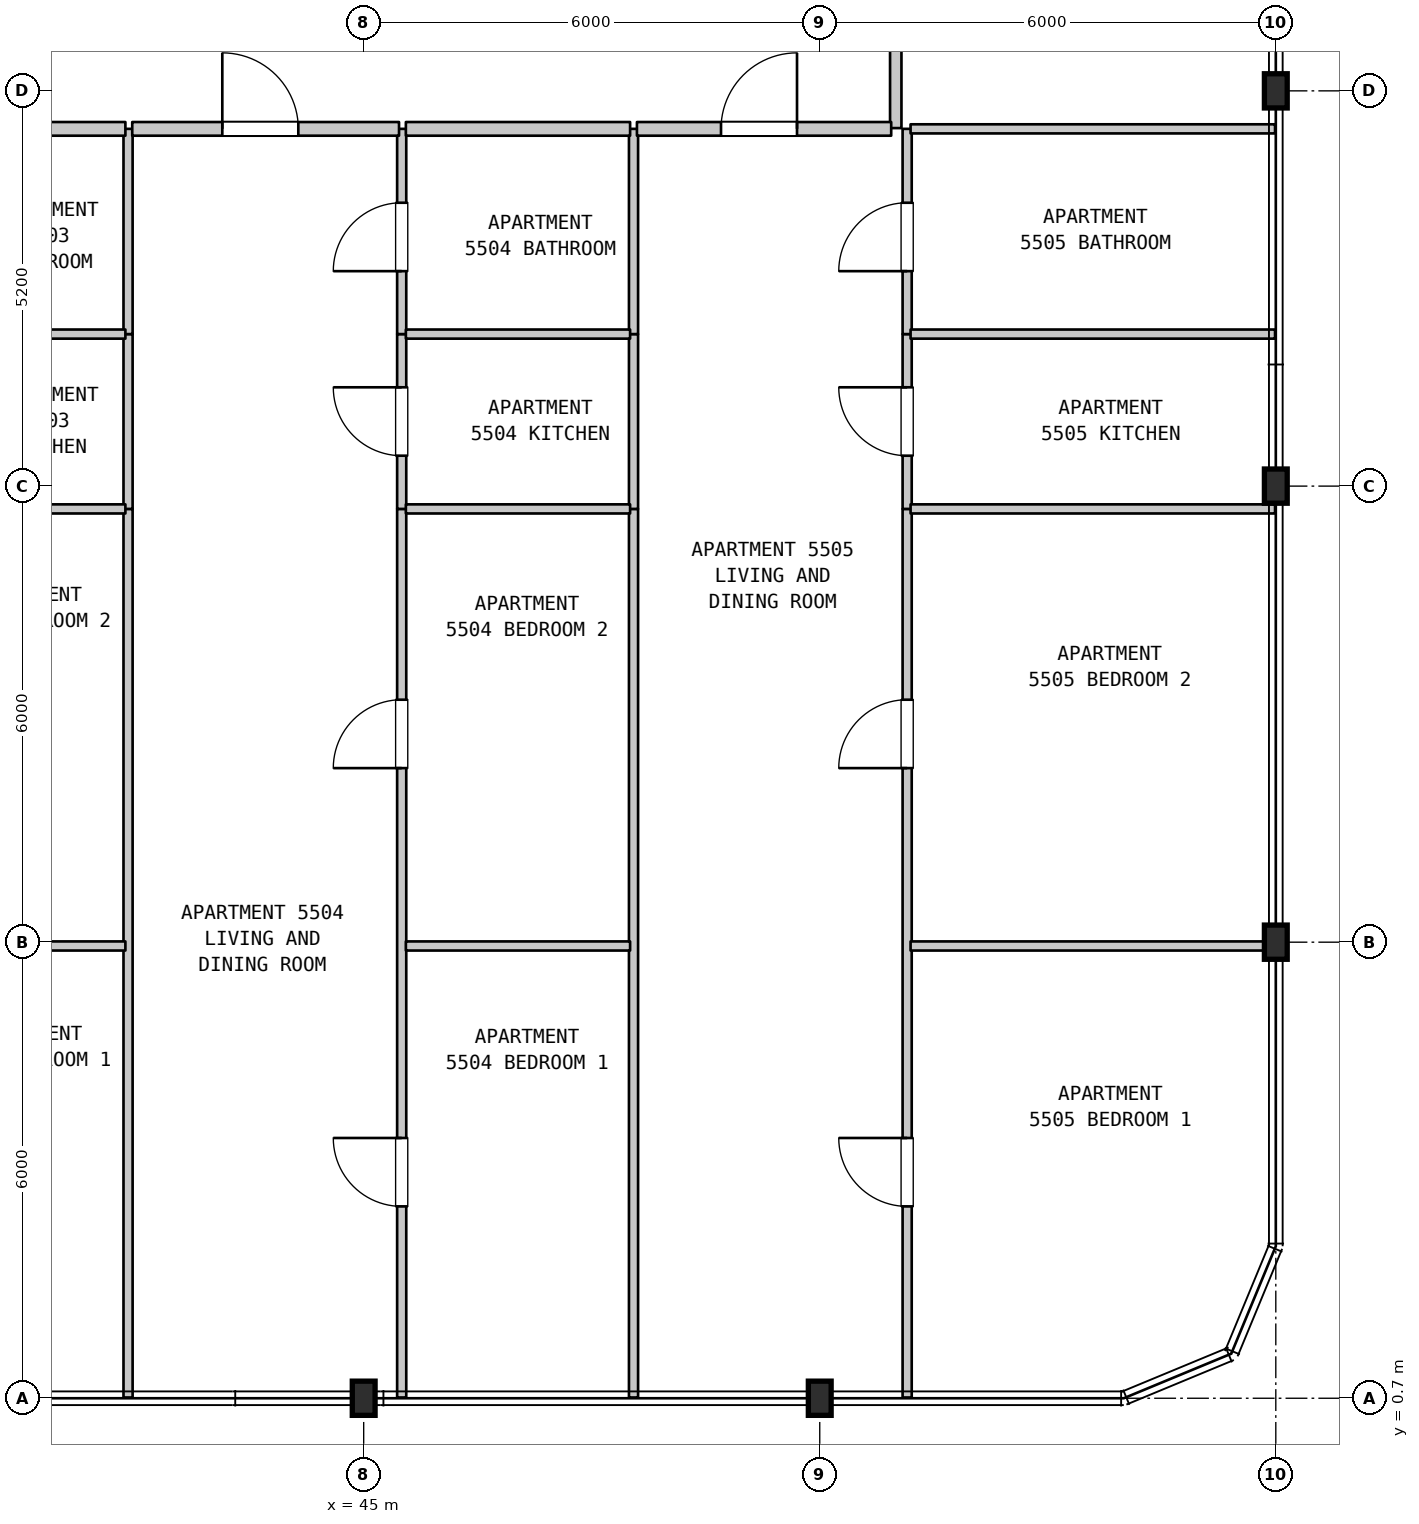
"""IFC4 building model, lengths in metres.
Left out: names, types, materials, properties, quantities, classifications, styles, units other than length and angle.
Written with IfcOpenShell. Run it as: python <this file> out.ifc"""

import sys

from ifc_helpers import new_model, si_unit, direction, frame, frame_2d, origin, origin_2d, place, context, subcontext, project, spatial, rectangle, i_section, extrude, element, fill, save


model = new_model("IFC4")
c1 = context("Model", 3, precision=1e-05, world=origin(), true_north=direction((0.0, 1.0)))
c2 = subcontext(c1, "Body", "Model", "MODEL_VIEW")
j1 = project(units=[si_unit("LENGTHUNIT", "METRE"), si_unit("PLANEANGLEUNIT", "RADIAN")], contexts=[c1])
p1 = place(None, origin())
s1 = spatial("IfcSite", under=j1, at=p1, CompositionType="ELEMENT")
p2 = place(p1, origin())
s2 = spatial("IfcBuilding", under=s1, at=p2, CompositionType="ELEMENT")
p3 = place(p2, frame((0.0, 0.0, 222.8)))
s3 = spatial("IfcBuildingStorey", under=s2, at=p3, CompositionType="ELEMENT", Elevation=222.8)
for number, where, z_axis, x_axis in (
    (1, (45.0, 0.7, 0.0), (0.0, 0.0, 1.0), (1.0, 0.0, 0.0)),
    (2, (51.0, 0.7, 0.0), (0.0, 0.0, 1.0), (1.0, 0.0, 0.0)),
    (3, (57.0, 6.7, 0.0), (0.0, 0.0, 1.0), (1.0, 0.0, 0.0)),
    (4, (57.0, 12.7, 0.0), (0.0, 0.0, 1.0), (1.0, 0.0, 0.0)),
    (5, (57.0, 17.9, 0.0), (0.0, 0.0, 1.0), (1.0, 0.0, 0.0)),
):
    element("IfcColumn", number, at=place(p3, frame(where, z_axis=z_axis, x_axis=x_axis)), inside=s3, PredefinedType="COLUMN", context=c2, shape_type="SweptSolid", body=[
        extrude(i_section(OverallWidth=0.3, OverallDepth=0.45, WebThickness=0.014, FlangeThickness=0.026, FilletRadius=0.027, at=origin_2d()), origin(), (0.0, 0.0, 1.0), 3.7),
    ])
p4 = place(p3, frame((41.9, 0.71, 0.0), z_axis=(0.0, 0.0, 1.0), x_axis=(0.0, 1.0, 0.0)))
e6 = element("IfcWall", 6, at=p4, inside=s3, PredefinedType="PARTITIONING", context=c2, shape_type="SweptSolid", body=[
    extrude(rectangle(XDim=11.69, YDim=0.12, at=frame_2d((5.845, 0.0))), origin(), (0.0, 0.0, 1.0), 3.39),
])
p5 = place(p3, frame((41.9, 12.4, 0.0), z_axis=(0.0, 0.0, 1.0), x_axis=(0.0, 1.0, 0.0)))
e7 = element("IfcWall", 7, at=p5, inside=s3, PredefinedType="PARTITIONING", context=c2, shape_type="SweptSolid", body=[
    extrude(rectangle(XDim=2.3, YDim=0.12, at=frame_2d((1.15, 0.0))), origin(), (0.0, 0.0, 1.0), 3.39),
])
p6 = place(p3, frame((41.9, 14.7, 0.0), z_axis=(0.0, 0.0, 1.0), x_axis=(0.0, 1.0, 0.0)))
e8 = element("IfcWall", 8, at=p6, inside=s3, PredefinedType="PARTITIONING", context=c2, shape_type="SweptSolid", body=[
    extrude(rectangle(XDim=2.7, YDim=0.12, at=frame_2d((1.35, 0.0))), origin(), (0.0, 0.0, 1.0), 3.39),
])
p7 = place(p3, frame((45.5, 0.71, 0.0), z_axis=(0.0, 0.0, 1.0), x_axis=(0.0, 1.0, 0.0)))
e9 = element("IfcWall", 9, at=p7, inside=s3, PredefinedType="PARTITIONING", context=c2, shape_type="SweptSolid", body=[
    extrude(rectangle(XDim=11.69, YDim=0.12, at=frame_2d((5.845, 0.0))), origin(), (0.0, 0.0, 1.0), 3.39),
])
p8 = place(p7, frame((2.514, 0.0, 0.0)))
e10 = element("IfcOpeningElement", 10, at=p8, cuts=e9, PredefinedType="OPENING", context=c2, shape_type="SweptSolid", body=[
    extrude(rectangle(XDim=0.9, YDim=2.15, at=frame_2d((0.45, 1.075))), frame((0.0, 0.07, 0.0), z_axis=(0.0, -1.0, 0.0), x_axis=(1.0, 0.0, 0.0)), (0.0, 0.0, 1.0), 0.14),
])
p9 = place(p7, frame((8.28, 0.0, 0.0)))
e11 = element("IfcOpeningElement", 11, at=p9, cuts=e9, PredefinedType="OPENING", context=c2, shape_type="SweptSolid", body=[
    extrude(rectangle(XDim=0.9, YDim=2.15, at=frame_2d((0.45, 1.075))), frame((0.0, 0.07, 0.0), z_axis=(0.0, -1.0, 0.0), x_axis=(1.0, 0.0, 0.0)), (0.0, 0.0, 1.0), 0.14),
])
p10 = place(p3, frame((45.5, 12.4, 0.0), z_axis=(0.0, 0.0, 1.0), x_axis=(0.0, 1.0, 0.0)))
e12 = element("IfcWall", 12, at=p10, inside=s3, PredefinedType="PARTITIONING", context=c2, shape_type="SweptSolid", body=[
    extrude(rectangle(XDim=2.3, YDim=0.12, at=frame_2d((1.15, 0.0))), origin(), (0.0, 0.0, 1.0), 3.39),
])
p11 = place(p10, frame((0.7, 0.0, 0.0)))
e13 = element("IfcOpeningElement", 13, at=p11, cuts=e12, PredefinedType="OPENING", context=c2, shape_type="SweptSolid", body=[
    extrude(rectangle(XDim=0.9, YDim=2.15, at=frame_2d((0.45, 1.075))), frame((0.0, 0.07, 0.0), z_axis=(0.0, -1.0, 0.0), x_axis=(1.0, 0.0, 0.0)), (0.0, 0.0, 1.0), 0.14),
])
p12 = place(p3, frame((45.5, 14.7, 0.0), z_axis=(0.0, 0.0, 1.0), x_axis=(0.0, 1.0, 0.0)))
e14 = element("IfcWall", 14, at=p12, inside=s3, PredefinedType="PARTITIONING", context=c2, shape_type="SweptSolid", body=[
    extrude(rectangle(XDim=2.7, YDim=0.12, at=frame_2d((1.35, 0.0))), origin(), (0.0, 0.0, 1.0), 3.39),
])
p13 = place(p12, frame((0.828, 0.0, 0.0)))
e15 = element("IfcOpeningElement", 15, at=p13, cuts=e14, PredefinedType="OPENING", context=c2, shape_type="SweptSolid", body=[
    extrude(rectangle(XDim=0.9, YDim=2.1, at=frame_2d((0.45, 1.05))), frame((0.0, 0.07, 0.0), z_axis=(0.0, -1.0, 0.0), x_axis=(1.0, 0.0, 0.0)), (0.0, 0.0, 1.0), 0.14),
])
p14 = place(p3, frame((48.55, 0.71, 0.0), z_axis=(0.0, 0.0, 1.0), x_axis=(0.0, 1.0, 0.0)))
e16 = element("IfcWall", 16, at=p14, inside=s3, PredefinedType="PARTITIONING", context=c2, shape_type="SweptSolid", body=[
    extrude(rectangle(XDim=11.69, YDim=0.12, at=frame_2d((5.845, 0.0))), origin(), (0.0, 0.0, 1.0), 3.39),
])
p15 = place(p3, frame((48.55, 12.4, 0.0), z_axis=(0.0, 0.0, 1.0), x_axis=(0.0, 1.0, 0.0)))
e17 = element("IfcWall", 17, at=p15, inside=s3, PredefinedType="PARTITIONING", context=c2, shape_type="SweptSolid", body=[
    extrude(rectangle(XDim=2.3, YDim=0.12, at=frame_2d((1.15, 0.0))), origin(), (0.0, 0.0, 1.0), 3.39),
])
p16 = place(p3, frame((48.55, 14.7, 0.0), z_axis=(0.0, 0.0, 1.0), x_axis=(0.0, 1.0, 0.0)))
e18 = element("IfcWall", 18, at=p16, inside=s3, PredefinedType="PARTITIONING", context=c2, shape_type="SweptSolid", body=[
    extrude(rectangle(XDim=2.7, YDim=0.12, at=frame_2d((1.35, 0.0))), origin(), (0.0, 0.0, 1.0), 3.39),
])
p17 = place(p3, frame((52.0, 17.41, 0.0), z_axis=(0.0, 0.0, 1.0), x_axis=(0.0, 1.0, 0.0)))
e19 = element("IfcWall", 19, at=p17, inside=s3, PredefinedType="STANDARD", context=c2, shape_type="SweptSolid", body=[
    extrude(rectangle(XDim=2.09, YDim=0.15, at=frame_2d((1.045, 0.0))), origin(), (0.0, 0.0, 1.0), 3.39),
])
p18 = place(p3, frame((52.15, 0.71, 0.0), z_axis=(0.0, 0.0, 1.0), x_axis=(0.0, 1.0, 0.0)))
e20 = element("IfcWall", 20, at=p18, inside=s3, PredefinedType="PARTITIONING", context=c2, shape_type="SweptSolid", body=[
    extrude(rectangle(XDim=11.69, YDim=0.12, at=frame_2d((5.845, 0.0))), origin(), (0.0, 0.0, 1.0), 3.39),
])
p19 = place(p18, frame((2.514, 0.0, 0.0)))
e21 = element("IfcOpeningElement", 21, at=p19, cuts=e20, PredefinedType="OPENING", context=c2, shape_type="SweptSolid", body=[
    extrude(rectangle(XDim=0.9, YDim=2.15, at=frame_2d((0.45, 1.075))), frame((0.0, 0.07, 0.0), z_axis=(0.0, -1.0, 0.0), x_axis=(1.0, 0.0, 0.0)), (0.0, 0.0, 1.0), 0.14),
])
p20 = place(p18, frame((8.28, 0.0, 0.0)))
e22 = element("IfcOpeningElement", 22, at=p20, cuts=e20, PredefinedType="OPENING", context=c2, shape_type="SweptSolid", body=[
    extrude(rectangle(XDim=0.9, YDim=2.15, at=frame_2d((0.45, 1.075))), frame((0.0, 0.07, 0.0), z_axis=(0.0, -1.0, 0.0), x_axis=(1.0, 0.0, 0.0)), (0.0, 0.0, 1.0), 0.14),
])
p21 = place(p3, frame((52.15, 12.4, 0.0), z_axis=(0.0, 0.0, 1.0), x_axis=(0.0, 1.0, 0.0)))
e23 = element("IfcWall", 23, at=p21, inside=s3, PredefinedType="PARTITIONING", context=c2, shape_type="SweptSolid", body=[
    extrude(rectangle(XDim=2.3, YDim=0.12, at=frame_2d((1.15, 0.0))), origin(), (0.0, 0.0, 1.0), 3.39),
])
p22 = place(p21, frame((0.7, 0.0, 0.0)))
e24 = element("IfcOpeningElement", 24, at=p22, cuts=e23, PredefinedType="OPENING", context=c2, shape_type="SweptSolid", body=[
    extrude(rectangle(XDim=0.9, YDim=2.15, at=frame_2d((0.45, 1.075))), frame((0.0, 0.07, 0.0), z_axis=(0.0, -1.0, 0.0), x_axis=(1.0, 0.0, 0.0)), (0.0, 0.0, 1.0), 0.14),
])
p23 = place(p3, frame((52.15, 14.7, 0.0), z_axis=(0.0, 0.0, 1.0), x_axis=(0.0, 1.0, 0.0)))
e25 = element("IfcWall", 25, at=p23, inside=s3, PredefinedType="PARTITIONING", context=c2, shape_type="SweptSolid", body=[
    extrude(rectangle(XDim=2.7, YDim=0.12, at=frame_2d((1.35, 0.0))), origin(), (0.0, 0.0, 1.0), 3.39),
])
p24 = place(p23, frame((0.828, 0.0, 0.0)))
e26 = element("IfcOpeningElement", 26, at=p24, cuts=e25, PredefinedType="OPENING", context=c2, shape_type="SweptSolid", body=[
    extrude(rectangle(XDim=0.9, YDim=2.1, at=frame_2d((0.45, 1.05))), frame((0.0, 0.07, 0.0), z_axis=(0.0, -1.0, 0.0), x_axis=(1.0, 0.0, 0.0)), (0.0, 0.0, 1.0), 0.14),
])
p25 = place(p3, frame((39.205, 6.65, 0.0), z_axis=(0.0, 0.0, 1.0), x_axis=(1.0, 0.0, 0.0)))
e27 = element("IfcWall", 27, at=p25, inside=s3, PredefinedType="PARTITIONING", context=c2, shape_type="SweptSolid", body=[
    extrude(rectangle(XDim=2.66, YDim=0.12, at=frame_2d((1.33, 0.0))), origin(), (0.0, 0.0, 1.0), 2.79),
])
p26 = place(p3, frame((45.555, 6.65, 0.0), z_axis=(0.0, 0.0, 1.0), x_axis=(1.0, 0.0, 0.0)))
e28 = element("IfcWall", 28, at=p26, inside=s3, PredefinedType="PARTITIONING", context=c2, shape_type="SweptSolid", body=[
    extrude(rectangle(XDim=2.95, YDim=0.12, at=frame_2d((1.475, 0.0))), origin(), (0.0, 0.0, 1.0), 2.79),
])
p27 = place(p3, frame((52.195, 6.65, 0.0), z_axis=(0.0, 0.0, 1.0), x_axis=(1.0, 0.0, 0.0)))
e29 = element("IfcWall", 29, at=p27, inside=s3, PredefinedType="PARTITIONING", context=c2, shape_type="SweptSolid", body=[
    extrude(rectangle(XDim=4.795, YDim=0.12, at=frame_2d((2.397, 0.0))), origin(), (0.0, 0.0, 1.0), 2.79),
])
p28 = place(p3, frame((39.205, 12.4, 0.0), z_axis=(0.0, 0.0, 1.0), x_axis=(1.0, 0.0, 0.0)))
e30 = element("IfcWall", 30, at=p28, inside=s3, PredefinedType="PARTITIONING", context=c2, shape_type="SweptSolid", body=[
    extrude(rectangle(XDim=2.66, YDim=0.12, at=frame_2d((1.33, 0.0))), origin(), (0.0, 0.0, 1.0), 3.39),
])
p29 = place(p3, frame((45.555, 12.4, 0.0), z_axis=(0.0, 0.0, 1.0), x_axis=(1.0, 0.0, 0.0)))
e31 = element("IfcWall", 31, at=p29, inside=s3, PredefinedType="PARTITIONING", context=c2, shape_type="SweptSolid", body=[
    extrude(rectangle(XDim=2.95, YDim=0.12, at=frame_2d((1.475, 0.0))), origin(), (0.0, 0.0, 1.0), 3.39),
])
p30 = place(p3, frame((52.195, 12.4, 0.0), z_axis=(0.0, 0.0, 1.0), x_axis=(1.0, 0.0, 0.0)))
e32 = element("IfcWall", 32, at=p30, inside=s3, PredefinedType="PARTITIONING", context=c2, shape_type="SweptSolid", body=[
    extrude(rectangle(XDim=4.795, YDim=0.12, at=frame_2d((2.397, 0.0))), origin(), (0.0, 0.0, 1.0), 3.39),
])
p31 = place(p3, frame((39.205, 14.7, 0.0), z_axis=(0.0, 0.0, 1.0), x_axis=(1.0, 0.0, 0.0)))
e33 = element("IfcWall", 33, at=p31, inside=s3, PredefinedType="PARTITIONING", context=c2, shape_type="SweptSolid", body=[
    extrude(rectangle(XDim=2.66, YDim=0.12, at=frame_2d((1.33, 0.0))), origin(), (0.0, 0.0, 1.0), 3.39),
])
p32 = place(p3, frame((45.555, 14.7, 0.0), z_axis=(0.0, 0.0, 1.0), x_axis=(1.0, 0.0, 0.0)))
e34 = element("IfcWall", 34, at=p32, inside=s3, PredefinedType="PARTITIONING", context=c2, shape_type="SweptSolid", body=[
    extrude(rectangle(XDim=2.95, YDim=0.12, at=frame_2d((1.475, 0.0))), origin(), (0.0, 0.0, 1.0), 3.39),
])
p33 = place(p3, frame((52.195, 14.7, 0.0), z_axis=(0.0, 0.0, 1.0), x_axis=(1.0, 0.0, 0.0)))
e35 = element("IfcWall", 35, at=p33, inside=s3, PredefinedType="PARTITIONING", context=c2, shape_type="SweptSolid", body=[
    extrude(rectangle(XDim=4.795, YDim=0.12, at=frame_2d((2.397, 0.0))), origin(), (0.0, 0.0, 1.0), 3.39),
])
p34 = place(p3, frame((39.205, 17.4, 0.0), z_axis=(0.0, 0.0, 1.0), x_axis=(1.0, 0.0, 0.0)))
e36 = element("IfcWall", 36, at=p34, inside=s3, PredefinedType="STANDARD", context=c2, shape_type="SweptSolid", body=[
    extrude(rectangle(XDim=2.66, YDim=0.18, at=frame_2d((1.33, 0.0))), origin(), (0.0, 0.0, 1.0), 3.39),
])
p35 = place(p3, frame((41.955, 17.4, 0.0), z_axis=(0.0, 0.0, 1.0), x_axis=(1.0, 0.0, 0.0)))
e37 = element("IfcWall", 37, at=p35, inside=s3, PredefinedType="STANDARD", context=c2, shape_type="SweptSolid", body=[
    extrude(rectangle(XDim=3.51, YDim=0.18, at=frame_2d((1.755, 0.0))), origin(), (0.0, 0.0, 1.0), 3.39),
])
p36 = place(p35, frame((1.185, 0.0, 0.0)))
e38 = element("IfcOpeningElement", 38, at=p36, cuts=e37, PredefinedType="OPENING", context=c2, shape_type="SweptSolid", body=[
    extrude(rectangle(XDim=1.0, YDim=2.15, at=frame_2d((0.5, 1.075))), frame((0.0, 0.1, 0.0), z_axis=(0.0, -1.0, 0.0), x_axis=(1.0, 0.0, 0.0)), (0.0, 0.0, 1.0), 0.2),
])
p37 = place(p3, frame((45.555, 17.4, 0.0), z_axis=(0.0, 0.0, 1.0), x_axis=(1.0, 0.0, 0.0)))
e39 = element("IfcWall", 39, at=p37, inside=s3, PredefinedType="STANDARD", context=c2, shape_type="SweptSolid", body=[
    extrude(rectangle(XDim=2.95, YDim=0.18, at=frame_2d((1.475, 0.0))), origin(), (0.0, 0.0, 1.0), 3.39),
])
p38 = place(p3, frame((48.595, 17.4, 0.0), z_axis=(0.0, 0.0, 1.0), x_axis=(1.0, 0.0, 0.0)))
e40 = element("IfcWall", 40, at=p38, inside=s3, PredefinedType="STANDARD", context=c2, shape_type="SweptSolid", body=[
    extrude(rectangle(XDim=3.345, YDim=0.18, at=frame_2d((1.672, 0.0))), origin(), (0.0, 0.0, 1.0), 3.39),
])
p39 = place(p38, frame((1.106, 0.0, 0.0)))
e41 = element("IfcOpeningElement", 41, at=p39, cuts=e40, PredefinedType="OPENING", context=c2, shape_type="SweptSolid", body=[
    extrude(rectangle(XDim=1.0, YDim=2.15, at=frame_2d((0.5, 1.075))), frame((0.0, 0.1, 0.0), z_axis=(0.0, -1.0, 0.0), x_axis=(1.0, 0.0, 0.0)), (0.0, 0.0, 1.0), 0.2),
])
p40 = place(p3, frame((52.195, 17.4, 0.0), z_axis=(0.0, 0.0, 1.0), x_axis=(1.0, 0.0, 0.0)))
e42 = element("IfcWall", 42, at=p40, inside=s3, PredefinedType="PARTITIONING", context=c2, shape_type="SweptSolid", body=[
    extrude(rectangle(XDim=4.795, YDim=0.12, at=frame_2d((2.397, 0.0))), origin(), (0.0, 0.0, 1.0), 3.39),
])
p41 = place(p8, origin())
e43 = element("IfcDoor", 43, at=p41, inside=s3, OperationType="SINGLE_SWING_RIGHT", PredefinedType="DOOR", context=c2, shape_type="SweptSolid", body=[
    extrude(rectangle(XDim=0.9, YDim=2.15, at=frame_2d((0.45, 1.075))), frame((0.0, 0.025, 0.0), z_axis=(0.0, -1.0, 0.0), x_axis=(1.0, 0.0, 0.0)), (0.0, 0.0, 1.0), 0.05),
])
fill(e10, e43)
p42 = place(p9, origin())
e44 = element("IfcDoor", 44, at=p42, inside=s3, OperationType="SINGLE_SWING_LEFT", PredefinedType="DOOR", context=c2, shape_type="SweptSolid", body=[
    extrude(rectangle(XDim=0.9, YDim=2.15, at=frame_2d((0.45, 1.075))), frame((0.0, 0.025, 0.0), z_axis=(0.0, -1.0, 0.0), x_axis=(1.0, 0.0, 0.0)), (0.0, 0.0, 1.0), 0.05),
])
fill(e11, e44)
p43 = place(p11, origin())
e45 = element("IfcDoor", 45, at=p43, inside=s3, OperationType="SINGLE_SWING_RIGHT", PredefinedType="DOOR", context=c2, shape_type="SweptSolid", body=[
    extrude(rectangle(XDim=0.9, YDim=2.15, at=frame_2d((0.45, 1.075))), frame((0.0, 0.025, 0.0), z_axis=(0.0, -1.0, 0.0), x_axis=(1.0, 0.0, 0.0)), (0.0, 0.0, 1.0), 0.05),
])
fill(e13, e45)
p44 = place(p13, origin())
e46 = element("IfcDoor", 46, at=p44, inside=s3, OperationType="SINGLE_SWING_LEFT", PredefinedType="DOOR", context=c2, shape_type="SweptSolid", body=[
    extrude(rectangle(XDim=0.9, YDim=2.1, at=frame_2d((0.45, 1.05))), frame((0.0, 0.025, 0.0), z_axis=(0.0, -1.0, 0.0), x_axis=(1.0, 0.0, 0.0)), (0.0, 0.0, 1.0), 0.05),
])
fill(e15, e46)
p45 = place(p19, origin())
e47 = element("IfcDoor", 47, at=p45, inside=s3, OperationType="SINGLE_SWING_RIGHT", PredefinedType="DOOR", context=c2, shape_type="SweptSolid", body=[
    extrude(rectangle(XDim=0.9, YDim=2.15, at=frame_2d((0.45, 1.075))), frame((0.0, 0.025, 0.0), z_axis=(0.0, -1.0, 0.0), x_axis=(1.0, 0.0, 0.0)), (0.0, 0.0, 1.0), 0.05),
])
fill(e21, e47)
p46 = place(p20, origin())
e48 = element("IfcDoor", 48, at=p46, inside=s3, OperationType="SINGLE_SWING_LEFT", PredefinedType="DOOR", context=c2, shape_type="SweptSolid", body=[
    extrude(rectangle(XDim=0.9, YDim=2.15, at=frame_2d((0.45, 1.075))), frame((0.0, 0.025, 0.0), z_axis=(0.0, -1.0, 0.0), x_axis=(1.0, 0.0, 0.0)), (0.0, 0.0, 1.0), 0.05),
])
fill(e22, e48)
p47 = place(p22, origin())
e49 = element("IfcDoor", 49, at=p47, inside=s3, OperationType="SINGLE_SWING_RIGHT", PredefinedType="DOOR", context=c2, shape_type="SweptSolid", body=[
    extrude(rectangle(XDim=0.9, YDim=2.15, at=frame_2d((0.45, 1.075))), frame((0.0, 0.025, 0.0), z_axis=(0.0, -1.0, 0.0), x_axis=(1.0, 0.0, 0.0)), (0.0, 0.0, 1.0), 0.05),
])
fill(e24, e49)
p48 = place(p24, origin())
e50 = element("IfcDoor", 50, at=p48, inside=s3, OperationType="SINGLE_SWING_LEFT", PredefinedType="DOOR", context=c2, shape_type="SweptSolid", body=[
    extrude(rectangle(XDim=0.9, YDim=2.1, at=frame_2d((0.45, 1.05))), frame((0.0, 0.025, 0.0), z_axis=(0.0, -1.0, 0.0), x_axis=(1.0, 0.0, 0.0)), (0.0, 0.0, 1.0), 0.05),
])
fill(e26, e50)
p49 = place(p36, origin())
e51 = element("IfcDoor", 51, at=p49, inside=s3, OperationType="SINGLE_SWING_LEFT", PredefinedType="DOOR", context=c2, shape_type="SweptSolid", body=[
    extrude(rectangle(XDim=1.0, YDim=2.15, at=frame_2d((0.5, 1.075))), frame((0.0, 0.025, 0.0), z_axis=(0.0, -1.0, 0.0), x_axis=(1.0, 0.0, 0.0)), (0.0, 0.0, 1.0), 0.05),
])
fill(e38, e51)
p50 = place(p39, origin())
e52 = element("IfcDoor", 52, at=p50, inside=s3, OperationType="SINGLE_SWING_RIGHT", PredefinedType="DOOR", context=c2, shape_type="SweptSolid", body=[
    extrude(rectangle(XDim=1.0, YDim=2.15, at=frame_2d((0.5, 1.075))), frame((0.0, 0.025, 0.0), z_axis=(0.0, -1.0, 0.0), x_axis=(1.0, 0.0, 0.0)), (0.0, 0.0, 1.0), 0.05),
])
fill(e41, e52)
save(model, sys.argv[1])
